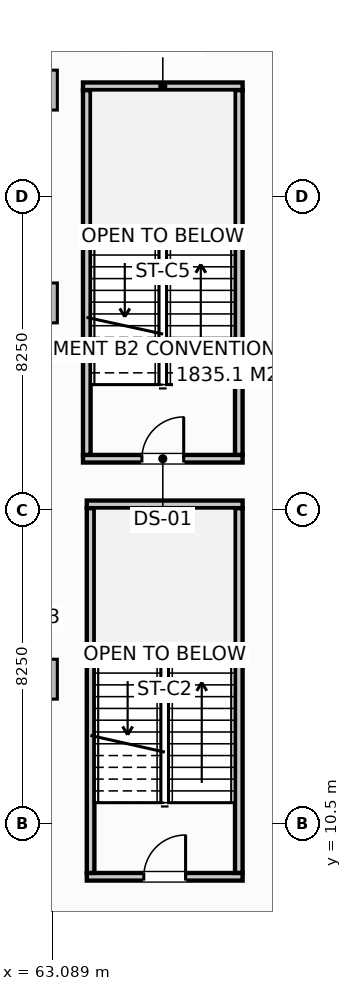
"""IFC4 building model, lengths in metres.
Left out: names, types, materials, properties, quantities, classifications, styles, units other than length and angle.
Written with IfcOpenShell. Run it as: python <this file> out.ifc"""

import sys

from ifc_helpers import new_model, si_unit, direction, frame, frame_2d, origin, origin_2d, place, context, subcontext, project, spatial, rectangle, extrude, element, fill, save


model = new_model("IFC4")
c1 = context("Model", 3, precision=1e-05, world=origin(), true_north=direction((0.0, 1.0)))
c2 = subcontext(c1, "Body", "Model", "MODEL_VIEW")
j1 = project(units=[si_unit("LENGTHUNIT", "METRE"), si_unit("PLANEANGLEUNIT", "RADIAN")], contexts=[c1])
p1 = place(None, origin())
s1 = spatial("IfcSite", under=j1, at=p1, CompositionType="ELEMENT")
p2 = place(p1, origin())
s2 = spatial("IfcBuilding", under=s1, at=p2, CompositionType="ELEMENT")
p3 = place(p2, frame((0.0, 0.0, -9.0)))
s3 = spatial("IfcBuildingStorey", under=s2, at=p3, CompositionType="ELEMENT", Elevation=-9.0)
for number, where, z_axis, x_axis in (
    (1, (62.7, 14.3, -0.32), (0.0, 0.0, 1.0), (1.0, 0.0, 0.0)),
    (2, (62.7, 24.2, -0.32), (0.0, 0.0, 1.0), (1.0, 0.0, 0.0)),
    (3, (62.7, 29.8, -0.32), (0.0, 0.0, 1.0), (1.0, 0.0, 0.0)),
):
    element("IfcColumn", number, at=place(p3, frame(where, z_axis=z_axis, x_axis=x_axis)), inside=s3, PredefinedType="COLUMN", context=c2, shape_type="SweptSolid", body=[
        extrude(rectangle(XDim=1.05, YDim=1.05, at=origin_2d()), origin(), (0.0, 0.0, 1.0), 4.5),
    ])
p4 = place(p3, frame((64.0, 9.1, -0.32), z_axis=(0.0, 0.0, 1.0), x_axis=(1.0, 0.0, 0.0)))
e4 = element("IfcWall", 4, at=p4, inside=s3, PredefinedType="SHEAR", context=c2, shape_type="SweptSolid", body=[
    extrude(rectangle(XDim=4.1, YDim=0.2, at=frame_2d((2.05, 0.0))), origin(), (0.0, 0.0, 1.0), 4.5),
])
p5 = place(p4, frame((1.5, 0.0, 0.32)))
e5 = element("IfcOpeningElement", 5, at=p5, cuts=e4, PredefinedType="OPENING", context=c2, shape_type="SweptSolid", body=[
    extrude(rectangle(XDim=1.1, YDim=2.15, at=frame_2d((0.55, 1.075))), frame((0.0, 0.11, 0.0), z_axis=(0.0, -1.0, 0.0), x_axis=(1.0, 0.0, 0.0)), (0.0, 0.0, 1.0), 0.22),
])
p6 = place(p3, frame((64.0, 18.9, -0.32), z_axis=(0.0, 0.0, 1.0), x_axis=(1.0, 0.0, 0.0)))
e6 = element("IfcWall", 6, at=p6, inside=s3, PredefinedType="SHEAR", context=c2, shape_type="SweptSolid", body=[
    extrude(rectangle(XDim=4.1, YDim=0.2, at=frame_2d((2.05, 0.0))), origin(), (0.0, 0.0, 1.0), 4.5),
])
for number, where, z_axis, x_axis in (
    (7, (64.1, 9.202, -0.32), (0.0, 0.0, 1.0), (0.0, 1.0, 0.0)),
    (8, (68.0, 9.202, -0.32), (0.0, 0.0, 1.0), (0.0, 1.0, 0.0)),
):
    element("IfcWall", number, at=place(p3, frame(where, z_axis=z_axis, x_axis=x_axis)), inside=s3, PredefinedType="SHEAR", context=c2, shape_type="SweptSolid", body=[
        extrude(rectangle(XDim=9.596, YDim=0.2, at=frame_2d((4.798, 0.0))), origin(), (0.0, 0.0, 1.0), 4.5),
    ])
p7 = place(p3, frame((63.9, 20.1, -0.32), z_axis=(0.0, 0.0, 1.0), x_axis=(1.0, 0.0, 0.0)))
e9 = element("IfcWall", 9, at=p7, inside=s3, PredefinedType="SHEAR", context=c2, shape_type="SweptSolid", body=[
    extrude(rectangle(XDim=4.2, YDim=0.2, at=frame_2d((2.1, 0.0))), origin(), (0.0, 0.0, 1.0), 4.5),
])
p8 = place(p7, frame((1.55, 0.0, 0.32)))
e10 = element("IfcOpeningElement", 10, at=p8, cuts=e9, PredefinedType="OPENING", context=c2, shape_type="SweptSolid", body=[
    extrude(rectangle(XDim=1.1, YDim=2.15, at=frame_2d((0.55, 1.075))), frame((0.0, 0.11, 0.0), z_axis=(0.0, -1.0, 0.0), x_axis=(1.0, 0.0, 0.0)), (0.0, 0.0, 1.0), 0.22),
])
p9 = place(p3, frame((63.9, 29.9, -0.32), z_axis=(0.0, 0.0, 1.0), x_axis=(1.0, 0.0, 0.0)))
e11 = element("IfcWall", 11, at=p9, inside=s3, PredefinedType="SHEAR", context=c2, shape_type="SweptSolid", body=[
    extrude(rectangle(XDim=4.2, YDim=0.2, at=frame_2d((2.1, 0.0))), origin(), (0.0, 0.0, 1.0), 4.5),
])
for number, where, z_axis, x_axis in (
    (12, (64.0, 20.202, -0.32), (0.0, 0.0, 1.0), (0.0, 1.0, 0.0)),
    (13, (68.0, 20.202, -0.32), (0.0, 0.0, 1.0), (0.0, 1.0, 0.0)),
):
    element("IfcWall", number, at=place(p3, frame(where, z_axis=z_axis, x_axis=x_axis)), inside=s3, PredefinedType="SHEAR", context=c2, shape_type="SweptSolid", body=[
        extrude(rectangle(XDim=9.596, YDim=0.2, at=frame_2d((4.798, 0.0))), origin(), (0.0, 0.0, 1.0), 4.5),
    ])
p10 = place(p5, origin())
e14 = element("IfcDoor", 14, at=p10, inside=s3, OperationType="SINGLE_SWING_RIGHT", PredefinedType="DOOR", context=c2, shape_type="SweptSolid", body=[
    extrude(rectangle(XDim=1.1, YDim=2.15, at=frame_2d((0.55, 1.075))), frame((0.0, 0.025, 0.0), z_axis=(0.0, -1.0, 0.0), x_axis=(1.0, 0.0, 0.0)), (0.0, 0.0, 1.0), 0.05),
])
fill(e5, e14)
p11 = place(p8, origin())
e15 = element("IfcDoor", 15, at=p11, inside=s3, OperationType="SINGLE_SWING_RIGHT", PredefinedType="DOOR", context=c2, shape_type="SweptSolid", body=[
    extrude(rectangle(XDim=1.1, YDim=2.15, at=frame_2d((0.55, 1.075))), frame((0.0, 0.025, 0.0), z_axis=(0.0, -1.0, 0.0), x_axis=(1.0, 0.0, 0.0)), (0.0, 0.0, 1.0), 0.05),
])
fill(e10, e15)
save(model, sys.argv[1])
